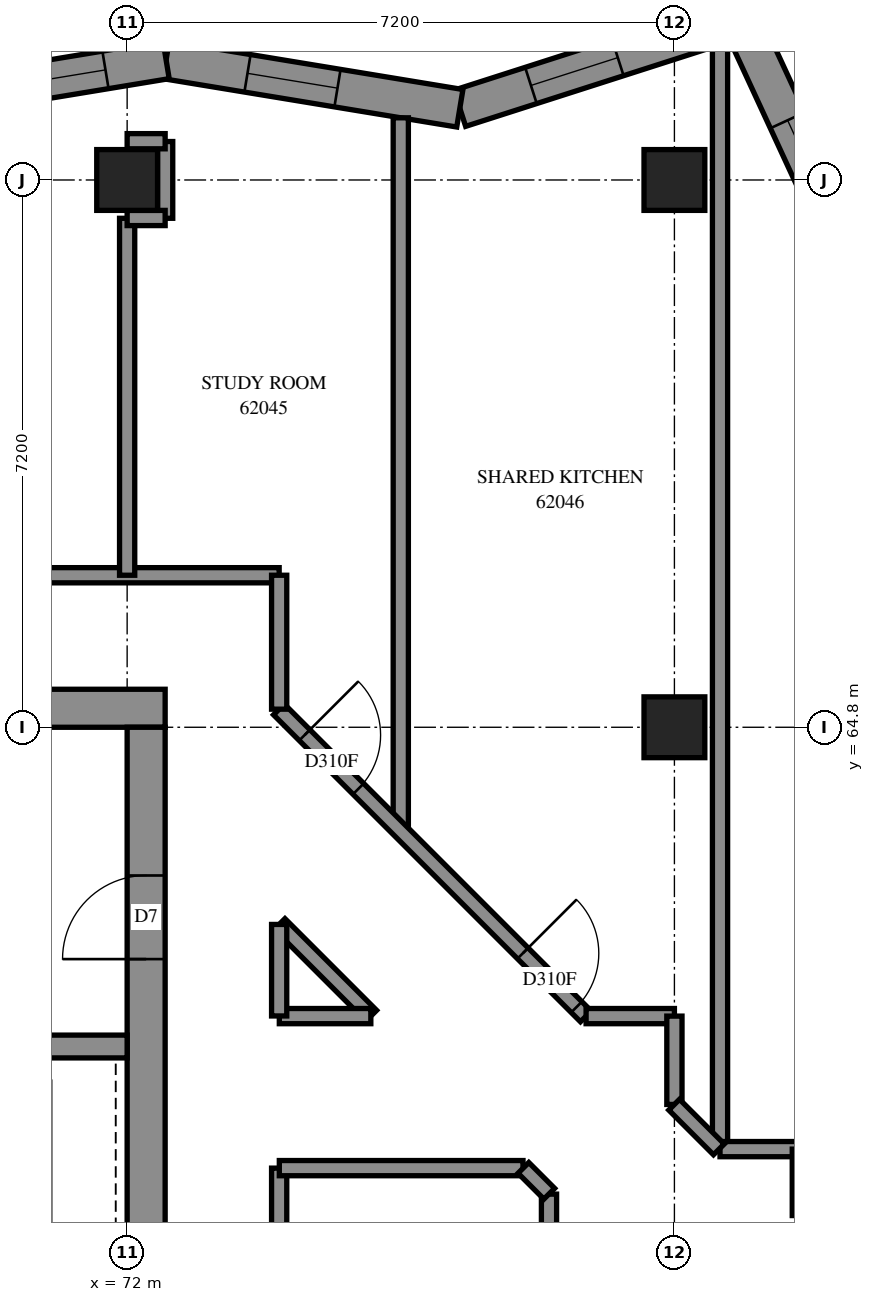
"""IFC4 building model, lengths in metres.
Left out: names, types, materials, properties, quantities, classifications, styles, units other than length and angle.
Written with IfcOpenShell. Run it as: python <this file> out.ifc"""

import sys

from ifc_helpers import new_model, si_unit, direction, frame, frame_2d, origin, origin_2d, place, context, subcontext, project, spatial, polyline, rectangle, outline, extrude, element, fill, save


model = new_model("IFC4")
c1 = context("Model", 3, precision=1e-05, world=origin(), true_north=direction((0.0, 1.0)))
c2 = subcontext(c1, "Body", "Model", "MODEL_VIEW")
j1 = project(units=[si_unit("LENGTHUNIT", "METRE"), si_unit("PLANEANGLEUNIT", "RADIAN")], contexts=[c1])
p1 = place(None, origin())
s1 = spatial("IfcSite", under=j1, at=p1, CompositionType="ELEMENT")
p2 = place(p1, origin())
s2 = spatial("IfcBuilding", under=s1, at=p2, CompositionType="ELEMENT")
p3 = place(p2, frame((0.0, 0.0, 227.0)))
s3 = spatial("IfcBuildingStorey", under=s2, at=p3, CompositionType="ELEMENT", Elevation=227.0)
for number, where, z_axis, x_axis in (
    (1, (72.0, 72.0, 0.0), (0.0, 0.0, 1.0), (1.0, 0.0, 0.0)),
    (2, (79.2, 64.8, 0.0), (0.0, 0.0, 1.0), (1.0, 0.0, 0.0)),
    (3, (79.2, 72.0, 0.0), (0.0, 0.0, 1.0), (1.0, 0.0, 0.0)),
):
    element("IfcColumn", number, at=place(p3, frame(where, z_axis=z_axis, x_axis=x_axis)), inside=s3, PredefinedType="COLUMN", context=c2, shape_type="SweptSolid", body=[
        extrude(rectangle(XDim=0.8, YDim=0.8, at=origin_2d()), origin(), (0.0, 0.0, 1.0), 3.1),
    ])
p4 = place(p3, frame((57.1, 65.05, -0.3), z_axis=(0.0, 0.0, 1.0), x_axis=(1.0, 0.0, 0.0)))
e4 = element("IfcWall", 4, at=p4, inside=s3, PredefinedType="SHEAR", context=c2, shape_type="SweptSolid", body=[
    extrude(rectangle(XDim=15.4, YDim=0.5, at=frame_2d((7.7, 0.0))), origin(), (0.0, 0.0, 1.0), 2.7),
])
p5 = place(p4, frame((10.5, 0.0, 0.3)))
e5 = element("IfcOpeningElement", 5, at=p5, cuts=e4, PredefinedType="OPENING", context=c2, shape_type="SweptSolid", body=[
    extrude(rectangle(XDim=0.8, YDim=2.1, at=frame_2d((0.4, 1.05))), frame((0.0, 0.26, 0.0), z_axis=(0.0, -1.0, 0.0), x_axis=(1.0, 0.0, 0.0)), (0.0, 0.0, 1.0), 0.52),
])
p6 = place(p3, frame((72.25, 50.4, -0.3), z_axis=(0.0, 0.0, 1.0), x_axis=(0.0, 1.0, 0.0)))
e6 = element("IfcWall", 6, at=p6, inside=s3, PredefinedType="SHEAR", context=c2, shape_type="SweptSolid", body=[
    extrude(rectangle(XDim=14.4, YDim=0.5, at=frame_2d((7.2, 0.0))), origin(), (0.0, 0.0, 1.0), 2.7),
])
p7 = place(p6, frame((4.55, 0.0, 0.3)))
e7 = element("IfcOpeningElement", 7, at=p7, cuts=e6, PredefinedType="OPENING", context=c2, shape_type="SweptSolid", body=[
    extrude(rectangle(XDim=1.1, YDim=2.1, at=frame_2d((0.55, 1.05))), frame((0.0, 0.26, 0.0), z_axis=(0.0, -1.0, 0.0), x_axis=(1.0, 0.0, 0.0)), (0.0, 0.0, 1.0), 0.52),
])
p8 = place(p6, frame((11.35, 0.0, 0.3)))
e8 = element("IfcOpeningElement", 8, at=p8, cuts=e6, PredefinedType="OPENING", context=c2, shape_type="SweptSolid", body=[
    extrude(rectangle(XDim=1.1, YDim=2.1, at=frame_2d((0.55, 1.05))), frame((0.0, 0.26, 0.0), z_axis=(0.0, -1.0, 0.0), x_axis=(1.0, 0.0, 0.0)), (0.0, 0.0, 1.0), 0.52),
])
p9 = place(p3, frame((64.8, 60.6, 0.0), z_axis=(0.0, 0.0, 1.0), x_axis=(1.0, 0.0, 0.0)))
e9 = element("IfcWall", 9, at=p9, inside=s3, PredefinedType="SOLIDWALL", context=c2, shape_type="SweptSolid", body=[
    extrude(rectangle(XDim=7.2, YDim=0.3, at=frame_2d((3.6, 0.0))), origin(), (0.0, 0.0, 1.0), 3.1),
])
p10 = place(p3, frame((76.478, 49.267, -0.3), z_axis=(0.0, 0.0, 1.0), x_axis=(0.7071067812, 0.7071067812, 0.0)))
e10 = element("IfcWall", 10, at=p10, inside=s3, PredefinedType="SHEAR", context=c2, shape_type="SweptSolid", body=[
    extrude(rectangle(XDim=14.4, YDim=0.5, at=frame_2d((7.2, 0.0))), origin(), (0.0, 0.0, 1.0), 2.7),
])
p11 = place(p10, frame((4.55, 0.0, 0.3)))
e11 = element("IfcOpeningElement", 11, at=p11, cuts=e10, PredefinedType="OPENING", context=c2, shape_type="SweptSolid", body=[
    extrude(rectangle(XDim=1.1, YDim=2.1, at=frame_2d((0.55, 1.05))), frame((0.0, 0.26, 0.0), z_axis=(0.0, -1.0, 0.0), x_axis=(1.0, 0.0, 0.0)), (0.0, 0.0, 1.0), 0.52),
])
p12 = place(p10, frame((11.35, 0.0, 0.3)))
e12 = element("IfcOpeningElement", 12, at=p12, cuts=e10, PredefinedType="OPENING", context=c2, shape_type="SweptSolid", body=[
    extrude(rectangle(XDim=1.1, YDim=2.1, at=frame_2d((0.55, 1.05))), frame((0.0, 0.26, 0.0), z_axis=(0.0, -1.0, 0.0), x_axis=(1.0, 0.0, 0.0)), (0.0, 0.0, 1.0), 0.52),
])
p13 = place(p3, frame((81.498, 71.033, 0.0), z_axis=(0.0, 0.0, 1.0), x_axis=(-0.4192777191, 0.9078580254, 0.0)))
e13 = element("IfcWall", 13, at=p13, inside=s3, PredefinedType="SOLIDWALL", context=c2, shape_type="SweptSolid", body=[
    extrude(outline(polyline([(0.069, -0.25), (3.629, -0.25), (3.187, 0.25), (-0.069, 0.25), (0.069, -0.25)])), origin(), (0.0, 0.0, 1.0), 3.1),
])
p14 = place(p13, frame((0.73, 0.0, 0.45)))
e14 = element("IfcOpeningElement", 14, at=p14, cuts=e13, PredefinedType="OPENING", context=c2, shape_type="SweptSolid", body=[
    extrude(rectangle(XDim=1.2, YDim=2.5, at=frame_2d((0.6, 1.25))), frame((0.0, 0.26, 0.0), z_axis=(0.0, -1.0, 0.0), x_axis=(1.0, 0.0, 0.0)), (0.0, 0.0, 1.0), 0.52),
])
p15 = place(p3, frame((80.069, 74.127, 0.0), z_axis=(0.0, 0.0, 1.0), x_axis=(-0.9522470121, -0.3053287213, 0.0)))
e15 = element("IfcWall", 15, at=p15, inside=s3, PredefinedType="SOLIDWALL", context=c2, shape_type="SweptSolid", body=[
    extrude(outline(polyline([(-0.221, -0.25), (3.817, -0.25), (3.938, 0.25), (0.221, 0.25), (-0.221, -0.25)])), origin(), (0.0, 0.0, 1.0), 3.1),
])
p16 = place(p15, frame((1.695, 0.0, 0.45)))
e16 = element("IfcOpeningElement", 16, at=p16, cuts=e15, PredefinedType="OPENING", context=c2, shape_type="SweptSolid", body=[
    extrude(rectangle(XDim=1.2, YDim=2.5, at=frame_2d((0.6, 1.25))), frame((0.0, 0.26, 0.0), z_axis=(0.0, -1.0, 0.0), x_axis=(1.0, 0.0, 0.0)), (0.0, 0.0, 1.0), 0.52),
])
p17 = place(p3, frame((76.377, 72.944, 0.0), z_axis=(0.0, 0.0, 1.0), x_axis=(-0.9867218052, 0.1624194546, 0.0)))
e17 = element("IfcWall", 17, at=p17, inside=s3, PredefinedType="SOLIDWALL", context=c2, shape_type="SweptSolid", body=[
    extrude(outline(polyline([(0.06, -0.25), (3.958, -0.25), (3.875, 0.25), (-0.06, 0.25), (0.06, -0.25)])), origin(), (0.0, 0.0, 1.0), 3.1),
])
p18 = place(p17, frame((1.631, 0.0, 0.45)))
e18 = element("IfcOpeningElement", 18, at=p18, cuts=e17, PredefinedType="OPENING", context=c2, shape_type="SweptSolid", body=[
    extrude(rectangle(XDim=1.2, YDim=2.5, at=frame_2d((0.6, 1.25))), frame((0.0, 0.26, 0.0), z_axis=(0.0, -1.0, 0.0), x_axis=(1.0, 0.0, 0.0)), (0.0, 0.0, 1.0), 0.52),
])
p19 = place(p3, frame((72.513, 73.58, 0.0), z_axis=(0.0, 0.0, 1.0), x_axis=(-0.9867206744, -0.1624263241, 0.0)))
e19 = element("IfcWall", 19, at=p19, inside=s3, PredefinedType="SOLIDWALL", context=c2, shape_type="SweptSolid", body=[
    extrude(outline(polyline([(-0.041, -0.25), (3.856, -0.25), (3.938, 0.25), (0.041, 0.25), (-0.041, -0.25)])), origin(), (0.0, 0.0, 1.0), 3.1),
])
p20 = place(p19, frame((0.808, 0.0, 0.45)))
e20 = element("IfcOpeningElement", 20, at=p20, cuts=e19, PredefinedType="OPENING", context=c2, shape_type="SweptSolid", body=[
    extrude(rectangle(XDim=1.3, YDim=2.5, at=frame_2d((0.65, 1.25))), frame((0.0, 0.26, 0.0), z_axis=(0.0, -1.0, 0.0), x_axis=(1.0, 0.0, 0.0)), (0.0, 0.0, 1.0), 0.52),
])
p21 = place(p19, frame((2.208, 0.0, 0.45)))
e21 = element("IfcOpeningElement", 21, at=p21, cuts=e19, PredefinedType="OPENING", context=c2, shape_type="SweptSolid", body=[
    extrude(rectangle(XDim=1.3, YDim=2.5, at=frame_2d((0.65, 1.25))), frame((0.0, 0.26, 0.0), z_axis=(0.0, -1.0, 0.0), x_axis=(1.0, 0.0, 0.0)), (0.0, 0.0, 1.0), 0.52),
])
p22 = place(p3, frame((55.6, 66.8, 0.0), z_axis=(0.0, 0.0, 1.0), x_axis=(1.0, 0.0, 0.0)))
e22 = element("IfcWall", 22, at=p22, inside=s3, PredefinedType="PARTITIONING", context=c2, shape_type="SweptSolid", body=[
    extrude(rectangle(XDim=18.4, YDim=0.2, at=frame_2d((9.2, 0.0))), origin(), (0.0, 0.0, 1.0), 3.1),
])
p23 = place(p22, frame((4.3, 0.0, 0.0)))
e23 = element("IfcOpeningElement", 23, at=p23, cuts=e22, PredefinedType="OPENING", context=c2, shape_type="SweptSolid", body=[
    extrude(rectangle(XDim=0.9, YDim=2.1, at=frame_2d((0.45, 1.05))), frame((0.0, 0.11, 0.0), z_axis=(0.0, -1.0, 0.0), x_axis=(1.0, 0.0, 0.0)), (0.0, 0.0, 1.0), 0.22),
])
p24 = place(p22, frame((6.0, 0.0, 0.0)))
e24 = element("IfcOpeningElement", 24, at=p24, cuts=e22, PredefinedType="OPENING", context=c2, shape_type="SweptSolid", body=[
    extrude(rectangle(XDim=0.9, YDim=2.1, at=frame_2d((0.45, 1.05))), frame((0.0, 0.11, 0.0), z_axis=(0.0, -1.0, 0.0), x_axis=(1.0, 0.0, 0.0)), (0.0, 0.0, 1.0), 0.22),
])
p25 = place(p22, frame((13.367, 0.0, 0.0)))
e25 = element("IfcOpeningElement", 25, at=p25, cuts=e22, PredefinedType="OPENING", context=c2, shape_type="SweptSolid", body=[
    extrude(rectangle(XDim=1.0, YDim=2.1, at=frame_2d((0.5, 1.05))), frame((0.0, 0.11, 0.0), z_axis=(0.0, -1.0, 0.0), x_axis=(1.0, 0.0, 0.0)), (0.0, 0.0, 1.0), 0.22),
])
p26 = place(p3, frame((79.8, 59.25, 0.0), z_axis=(0.0, 0.0, 1.0), x_axis=(0.0, 1.0, 0.0)))
e26 = element("IfcWall", 26, at=p26, inside=s3, PredefinedType="PARTITIONING", context=c2, shape_type="SweptSolid", body=[
    extrude(rectangle(XDim=14.528, YDim=0.2, at=frame_2d((7.264, 0.0))), origin(), (0.0, 0.0, 1.0), 3.1),
])
p27 = place(p3, frame((80.849, 58.377, 0.0), z_axis=(0.0, 0.0, 1.0), x_axis=(0.7071120471, 0.7071015152, 0.0)))
e27 = element("IfcWall", 27, at=p27, inside=s3, PredefinedType="PARTITIONING", context=c2, shape_type="SweptSolid", body=[
    extrude(rectangle(XDim=9.495, YDim=0.2, at=frame_2d((4.747, 0.0))), origin(), (0.0, 0.0, 1.0), 3.1),
])
p28 = place(p3, frame((75.6, 63.438, 0.0), z_axis=(0.0, 0.0, 1.0), x_axis=(0.0, 1.0, 0.0)))
e28 = element("IfcWall", 28, at=p28, inside=s3, PredefinedType="PARTITIONING", context=c2, shape_type="SweptSolid", body=[
    extrude(rectangle(XDim=9.38, YDim=0.2, at=frame_2d((4.69, 0.0))), origin(), (0.0, 0.0, 1.0), 3.1),
])
p29 = place(p3, frame((73.997, 65.035, 0.0), z_axis=(0.0, 0.0, 1.0), x_axis=(0.7071067812, -0.7071067812, 0.0)))
e29 = element("IfcWall", 29, at=p29, inside=s3, PredefinedType="PARTITIONING", context=c2, shape_type="SweptSolid", body=[
    extrude(rectangle(XDim=5.711, YDim=0.2, at=frame_2d((2.855, 0.0))), origin(), (0.0, 0.0, 1.0), 3.1),
])
p30 = place(p29, frame((0.478, 0.0, 0.0)))
e30 = element("IfcOpeningElement", 30, at=p30, cuts=e29, PredefinedType="OPENING", context=c2, shape_type="SweptSolid", body=[
    extrude(rectangle(XDim=1.0, YDim=2.1, at=frame_2d((0.5, 1.05))), frame((0.0, 0.11, 0.0), z_axis=(0.0, -1.0, 0.0), x_axis=(1.0, 0.0, 0.0)), (0.0, 0.0, 1.0), 0.22),
])
p31 = place(p29, frame((4.538, 0.0, 0.0)))
e31 = element("IfcOpeningElement", 31, at=p31, cuts=e29, PredefinedType="OPENING", context=c2, shape_type="SweptSolid", body=[
    extrude(rectangle(XDim=1.0, YDim=2.1, at=frame_2d((0.5, 1.05))), frame((0.0, 0.11, 0.0), z_axis=(0.0, -1.0, 0.0), x_axis=(1.0, 0.0, 0.0)), (0.0, 0.0, 1.0), 0.22),
])
p32 = place(p3, frame((74.0, 53.802, 0.0), z_axis=(0.0, 0.0, 1.0), x_axis=(0.0, 1.0, 0.0)))
e32 = element("IfcWall", 32, at=p32, inside=s3, PredefinedType="PARTITIONING", context=c2, shape_type="SweptSolid", body=[
    extrude(rectangle(XDim=5.198, YDim=0.2, at=frame_2d((2.599, 0.0))), origin(), (0.0, 0.0, 1.0), 3.1),
])
p33 = place(p3, frame((72.0, 66.8, 0.0), z_axis=(0.0, 0.0, 1.0), x_axis=(0.0, 1.0, 0.0)))
e33 = element("IfcWall", 33, at=p33, inside=s3, PredefinedType="PARTITIONING", context=c2, shape_type="SweptSolid", body=[
    extrude(rectangle(XDim=4.696, YDim=0.2, at=frame_2d((2.348, 0.0))), origin(), (0.0, 0.0, 1.0), 3.1),
])
p34 = place(p3, frame((74.002, 59.0, 0.0), z_axis=(0.0, 0.0, 1.0), x_axis=(1.0, 0.0, 0.0)))
e34 = element("IfcWall", 34, at=p34, inside=s3, PredefinedType="PARTITIONING", context=c2, shape_type="SweptSolid", body=[
    extrude(rectangle(XDim=3.206, YDim=0.2, at=frame_2d((1.603, 0.0))), origin(), (0.0, 0.0, 1.0), 3.1),
])
p35 = place(p3, frame((77.55, 55.952, 0.0), z_axis=(0.0, 0.0, 1.0), x_axis=(0.0, 1.0, 0.0)))
e35 = element("IfcWall", 35, at=p35, inside=s3, PredefinedType="PARTITIONING", context=c2, shape_type="SweptSolid", body=[
    extrude(rectangle(XDim=2.706, YDim=0.2, at=frame_2d((1.353, 0.0))), origin(), (0.0, 0.0, 1.0), 3.1),
])
p36 = place(p3, frame((74.0, 65.038, 0.0), z_axis=(0.0, 0.0, 1.0), x_axis=(0.0, 1.0, 0.0)))
e36 = element("IfcWall", 36, at=p36, inside=s3, PredefinedType="PARTITIONING", context=c2, shape_type="SweptSolid", body=[
    extrude(rectangle(XDim=1.762, YDim=0.2, at=frame_2d((0.881, 0.0))), origin(), (0.0, 0.0, 1.0), 3.1),
])
p37 = place(p3, frame((74.005, 62.212, 0.0), z_axis=(0.0, 0.0, 1.0), x_axis=(0.7071067812, -0.7071067812, 0.0)))
e37 = element("IfcWall", 37, at=p37, inside=s3, PredefinedType="PARTITIONING", context=c2, shape_type="SweptSolid", body=[
    extrude(rectangle(XDim=1.706, YDim=0.2, at=frame_2d((0.853, 0.0))), origin(), (0.0, 0.0, 1.0), 3.1),
])
for number, where, z_axis, x_axis in (
    (38, (74.002, 61.0, 0.0), (0.0, 0.0, 1.0), (1.0, 0.0, 0.0)),
    (39, (74.0, 61.002, 0.0), (0.0, 0.0, 1.0), (0.0, 1.0, 0.0)),
):
    element("IfcWall", number, at=place(p3, frame(where, z_axis=z_axis, x_axis=x_axis)), inside=s3, PredefinedType="PARTITIONING", context=c2, shape_type="SweptSolid", body=[
        extrude(rectangle(XDim=1.204, YDim=0.2, at=frame_2d((0.602, 0.0))), origin(), (0.0, 0.0, 1.0), 3.1),
    ])
for number, where, z_axis, x_axis in (
    (40, (78.038, 61.0, 0.0), (0.0, 0.0, 1.0), (1.0, 0.0, 0.0)),
    (41, (79.2, 59.838, 0.0), (0.0, 0.0, 1.0), (0.0, 1.0, 0.0)),
):
    element("IfcWall", number, at=place(p3, frame(where, z_axis=z_axis, x_axis=x_axis)), inside=s3, PredefinedType="PARTITIONING", context=c2, shape_type="SweptSolid", body=[
        extrude(rectangle(XDim=1.162, YDim=0.2, at=frame_2d((0.581, 0.0))), origin(), (0.0, 0.0, 1.0), 3.1),
    ])
p38 = place(p3, frame((79.8, 59.25, 0.0), z_axis=(0.0, 0.0, 1.0), x_axis=(1.0, 0.0, 0.0)))
e42 = element("IfcWall", 42, at=p38, inside=s3, PredefinedType="PARTITIONING", context=c2, shape_type="SweptSolid", body=[
    extrude(rectangle(XDim=1.05, YDim=0.2, at=frame_2d((0.525, 0.0))), origin(), (0.0, 0.0, 1.0), 3.1),
])
p39 = place(p3, frame((72.5, 71.496, 0.0), z_axis=(0.0, 0.0, 1.0), x_axis=(0.0, 1.0, 0.0)))
e43 = element("IfcWall", 43, at=p39, inside=s3, PredefinedType="PARTITIONING", context=c2, shape_type="SweptSolid", body=[
    extrude(rectangle(XDim=1.01, YDim=0.2, at=frame_2d((0.505, 0.0))), origin(), (0.0, 0.0, 1.0), 3.1),
])
p40 = place(p3, frame((80.85, 58.376, 0.0), z_axis=(0.0, 0.0, 1.0), x_axis=(0.0, 1.0, 0.0)))
e44 = element("IfcWall", 44, at=p40, inside=s3, PredefinedType="PARTITIONING", context=c2, shape_type="SweptSolid", body=[
    extrude(rectangle(XDim=0.874, YDim=0.2, at=frame_2d((0.437, 0.0))), origin(), (0.0, 0.0, 1.0), 3.1),
])
p41 = place(p3, frame((79.197, 59.835, 0.0), z_axis=(0.0, 0.0, 1.0), x_axis=(0.7071067812, -0.7071067812, 0.0)))
e45 = element("IfcWall", 45, at=p41, inside=s3, PredefinedType="PARTITIONING", context=c2, shape_type="SweptSolid", body=[
    extrude(rectangle(XDim=0.832, YDim=0.2, at=frame_2d((0.416, 0.0))), origin(), (0.0, 0.0, 1.0), 3.1),
])
for number, where, z_axis, x_axis in (
    (46, (72.0, 72.51, 0.0), (0.0, 0.0, 1.0), (1.0, 0.0, 0.0)),
    (47, (72.0, 71.5, 0.0), (0.0, 0.0, 1.0), (1.0, 0.0, 0.0)),
):
    element("IfcWall", number, at=place(p3, frame(where, z_axis=z_axis, x_axis=x_axis)), inside=s3, PredefinedType="PARTITIONING", context=c2, shape_type="SweptSolid", body=[
        extrude(rectangle(XDim=0.5, YDim=0.2, at=frame_2d((0.25, 0.0))), origin(), (0.0, 0.0, 1.0), 3.1),
    ])
p42 = place(p3, frame((77.213, 59.004, 0.0), z_axis=(0.0, 0.0, 1.0), x_axis=(0.7071067812, -0.7071067812, 0.0)))
e48 = element("IfcWall", 48, at=p42, inside=s3, PredefinedType="PARTITIONING", context=c2, shape_type="SweptSolid", body=[
    extrude(rectangle(XDim=0.481, YDim=0.2, at=frame_2d((0.24, 0.0))), origin(), (0.0, 0.0, 1.0), 3.1),
])
p43 = place(p14, origin())
e49 = element("IfcWindow", 49, at=p43, inside=s3, PartitioningType="SINGLE_PANEL", PredefinedType="WINDOW", context=c2, shape_type="SweptSolid", body=[
    extrude(rectangle(XDim=1.2, YDim=2.5, at=frame_2d((0.6, 1.25))), frame((0.0, 0.18, 0.0), z_axis=(0.0, -1.0, 0.0), x_axis=(1.0, 0.0, 0.0)), (0.0, 0.0, 1.0), 0.06),
])
fill(e14, e49)
p44 = place(p16, origin())
e50 = element("IfcWindow", 50, at=p44, inside=s3, PartitioningType="SINGLE_PANEL", PredefinedType="WINDOW", context=c2, shape_type="SweptSolid", body=[
    extrude(rectangle(XDim=1.2, YDim=2.5, at=frame_2d((0.6, 1.25))), frame((0.0, 0.18, 0.0), z_axis=(0.0, -1.0, 0.0), x_axis=(1.0, 0.0, 0.0)), (0.0, 0.0, 1.0), 0.06),
])
fill(e16, e50)
p45 = place(p18, origin())
e51 = element("IfcWindow", 51, at=p45, inside=s3, PartitioningType="SINGLE_PANEL", PredefinedType="WINDOW", context=c2, shape_type="SweptSolid", body=[
    extrude(rectangle(XDim=1.2, YDim=2.5, at=frame_2d((0.6, 1.25))), frame((0.0, 0.18, 0.0), z_axis=(0.0, -1.0, 0.0), x_axis=(1.0, 0.0, 0.0)), (0.0, 0.0, 1.0), 0.06),
])
fill(e18, e51)
p46 = place(p20, origin())
e52 = element("IfcWindow", 52, at=p46, inside=s3, PartitioningType="SINGLE_PANEL", PredefinedType="WINDOW", context=c2, shape_type="SweptSolid", body=[
    extrude(rectangle(XDim=1.3, YDim=2.5, at=frame_2d((0.65, 1.25))), frame((0.0, 0.18, 0.0), z_axis=(0.0, -1.0, 0.0), x_axis=(1.0, 0.0, 0.0)), (0.0, 0.0, 1.0), 0.06),
])
fill(e20, e52)
p47 = place(p8, origin())
e53 = element("IfcDoor", 53, at=p47, inside=s3, OperationType="SINGLE_SWING_RIGHT", PredefinedType="DOOR", context=c2, shape_type="SweptSolid", body=[
    extrude(rectangle(XDim=1.1, YDim=2.1, at=frame_2d((0.55, 1.05))), frame((0.0, 0.025, 0.0), z_axis=(0.0, -1.0, 0.0), x_axis=(1.0, 0.0, 0.0)), (0.0, 0.0, 1.0), 0.05),
])
fill(e8, e53)
p48 = place(p30, origin())
e54 = element("IfcDoor", 54, at=p48, inside=s3, OperationType="SINGLE_SWING_RIGHT", PredefinedType="DOOR", context=c2, shape_type="SweptSolid", body=[
    extrude(rectangle(XDim=1.0, YDim=2.1, at=frame_2d((0.5, 1.05))), frame((0.0, 0.025, 0.0), z_axis=(0.0, -1.0, 0.0), x_axis=(1.0, 0.0, 0.0)), (0.0, 0.0, 1.0), 0.05),
])
fill(e30, e54)
p49 = place(p31, origin())
e55 = element("IfcDoor", 55, at=p49, inside=s3, OperationType="SINGLE_SWING_LEFT", PredefinedType="DOOR", context=c2, shape_type="SweptSolid", body=[
    extrude(rectangle(XDim=1.0, YDim=2.1, at=frame_2d((0.5, 1.05))), frame((0.0, 0.025, 0.0), z_axis=(0.0, -1.0, 0.0), x_axis=(1.0, 0.0, 0.0)), (0.0, 0.0, 1.0), 0.05),
])
fill(e31, e55)
save(model, sys.argv[1])
